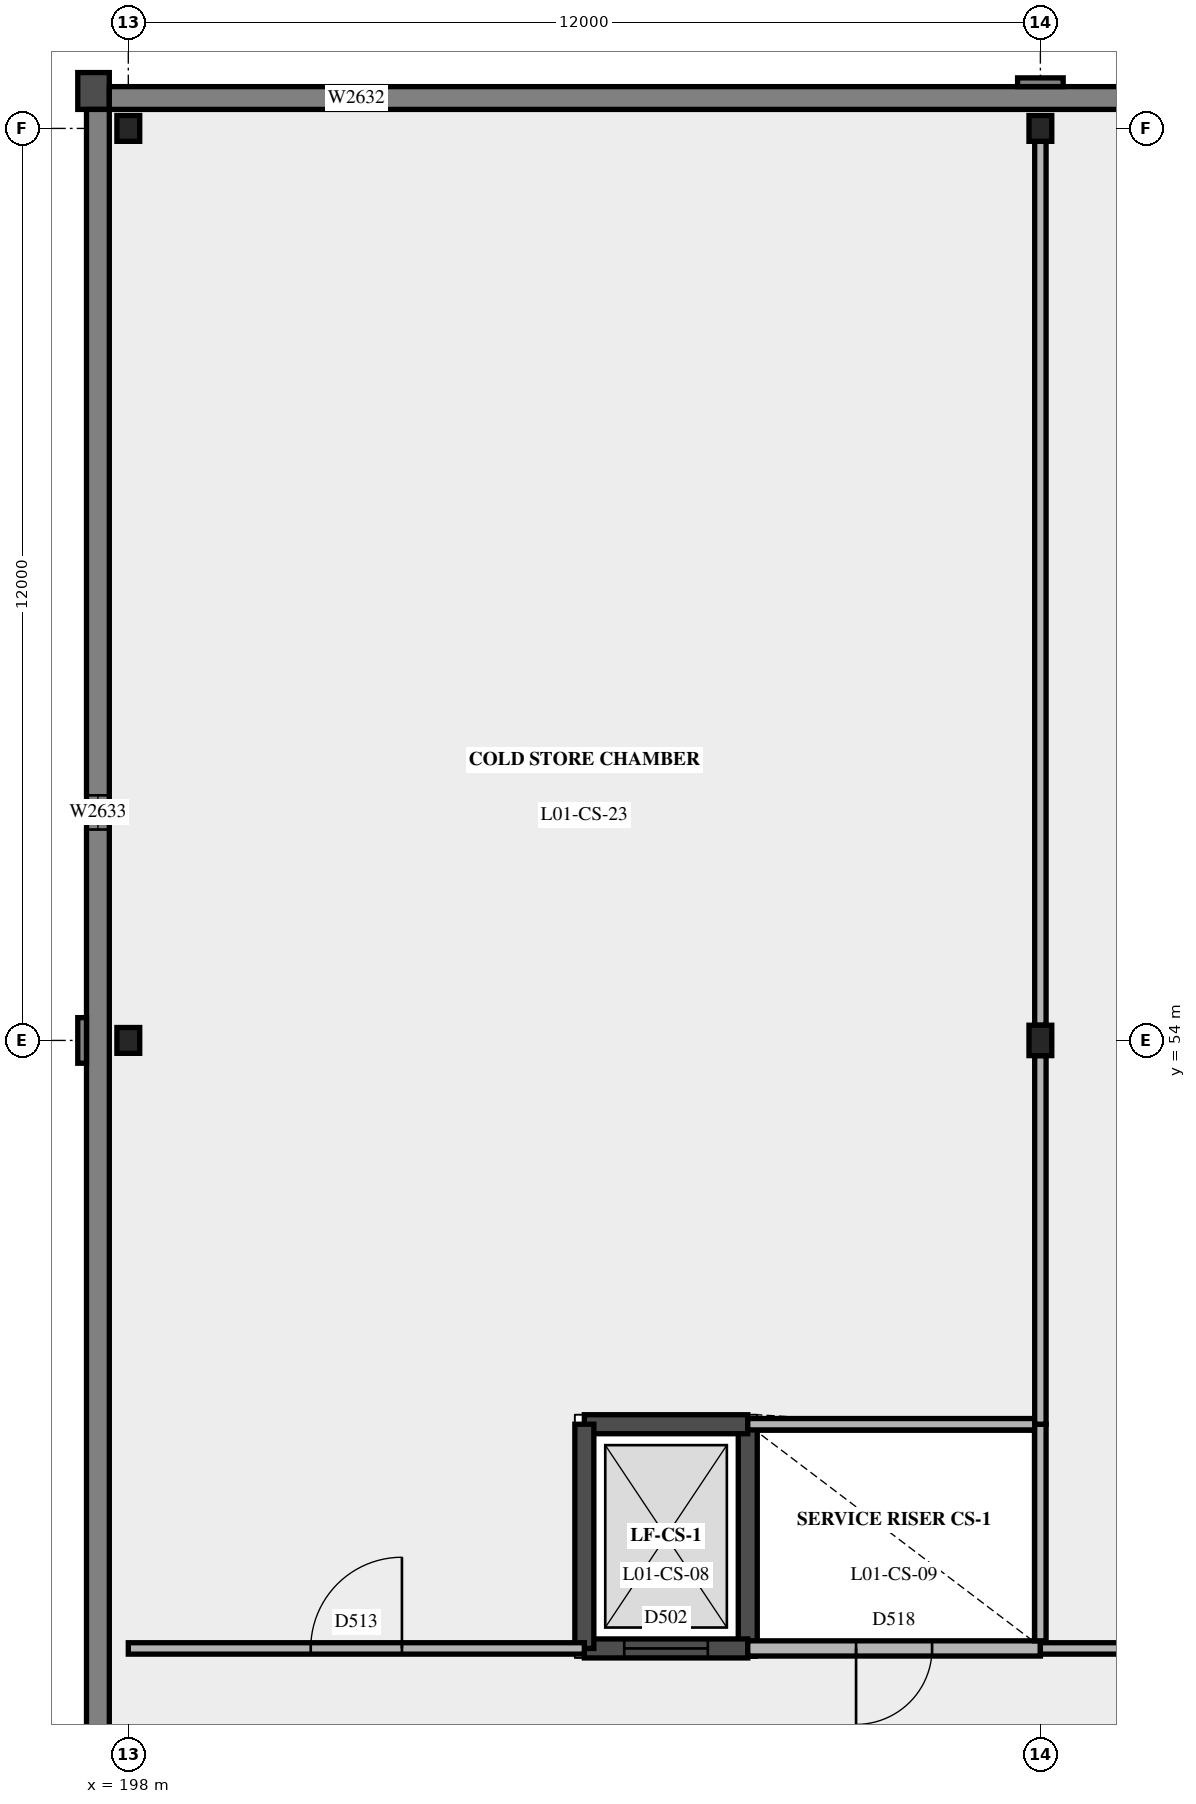
"""IFC4 building model, lengths in metres.
Left out: names, types, materials, properties, quantities, classifications, styles, units other than length and angle.
Written with IfcOpenShell. Run it as: python <this file> out.ifc"""

import sys

from ifc_helpers import new_model, si_unit, direction, frame, frame_2d, origin, origin_2d, place, context, subcontext, project, spatial, polyline, rectangle, i_section, outline, extrude, element, fill, save


model = new_model("IFC4")
c1 = context("Model", 3, precision=1e-05, world=origin(), true_north=direction((0.0, 1.0)))
c2 = subcontext(c1, "Body", "Model", "MODEL_VIEW")
j1 = project(units=[si_unit("LENGTHUNIT", "METRE"), si_unit("PLANEANGLEUNIT", "RADIAN")], contexts=[c1])
p1 = place(None, origin())
s1 = spatial("IfcSite", under=j1, at=p1, CompositionType="ELEMENT")
p2 = place(p1, origin())
s2 = spatial("IfcBuilding", under=s1, at=p2, CompositionType="ELEMENT")
p3 = place(p2, frame((0.0, 0.0, 5.4)))
s3 = spatial("IfcBuildingStorey", under=s2, at=p3, CompositionType="ELEMENT", Elevation=5.4)
for number, where, z_axis, x_axis in (
    (1, (198.0, 54.0, 0.0), (0.0, 0.0, 1.0), (1.0, 0.0, 0.0)),
    (2, (198.0, 66.0, 0.0), (0.0, 0.0, 1.0), (1.0, 0.0, 0.0)),
):
    element("IfcColumn", number, at=place(p3, frame(where, z_axis=z_axis, x_axis=x_axis)), inside=s3, PredefinedType="COLUMN", context=c2, shape_type="SweptSolid", body=[
        extrude(i_section(OverallWidth=0.3, OverallDepth=0.34, WebThickness=0.012, FlangeThickness=0.021, at=origin_2d()), origin(), (0.0, 0.0, 1.0), 5.4),
    ])
p4 = place(p3, frame((210.0, 54.0, 0.0), z_axis=(0.0, 0.0, 1.0), x_axis=(1.0, 0.0, 0.0)))
e3 = element("IfcColumn", 3, at=p4, inside=s3, PredefinedType="COLUMN", context=c2, shape_type="SweptSolid", body=[
    extrude(i_section(OverallWidth=0.3, OverallDepth=0.4, WebThickness=0.013, FlangeThickness=0.024, at=origin_2d()), origin(), (0.0, 0.0, 1.0), 5.4),
])
p5 = place(p3, frame((210.0, 66.0, 0.0), z_axis=(0.0, 0.0, 1.0), x_axis=(1.0, 0.0, 0.0)))
e4 = element("IfcColumn", 4, at=p5, inside=s3, PredefinedType="COLUMN", context=c2, shape_type="SweptSolid", body=[
    extrude(i_section(OverallWidth=0.3, OverallDepth=0.34, WebThickness=0.012, FlangeThickness=0.021, at=origin_2d()), origin(), (0.0, 0.0, 1.0), 5.4),
])
p6 = place(p3, frame((197.75, 66.528, -0.39), z_axis=(0.0, 0.0, 1.0), x_axis=(-1.0, 0.0, 0.0)))
e5 = element("IfcWall", 5, at=p6, inside=s3, PredefinedType="SOLIDWALL", context=c2, shape_type="SweptSolid", body=[
    extrude(rectangle(XDim=0.53, YDim=0.555, at=frame_2d((0.265, 0.0))), origin(), (0.0, 0.0, 1.0), 0.13),
])
p7 = place(p3, frame((197.75, 66.562, -0.26), z_axis=(0.0, 0.0, 1.0), x_axis=(-1.0, 0.0, 0.0)))
e6 = element("IfcWall", 6, at=p7, inside=s3, PredefinedType="SOLIDWALL", context=c2, shape_type="SweptSolid", body=[
    extrude(rectangle(XDim=0.645, YDim=0.625, at=frame_2d((0.323, 0.0))), origin(), (0.0, 0.0, 1.0), 0.13),
])
p8 = place(p3, frame((197.75, 66.597, -0.13), z_axis=(0.0, 0.0, 1.0), x_axis=(-1.0, 0.0, 0.0)))
e7 = element("IfcWall", 7, at=p8, inside=s3, PredefinedType="SOLIDWALL", context=c2, shape_type="SweptSolid", body=[
    extrude(rectangle(XDim=0.76, YDim=0.695, at=frame_2d((0.38, 0.0))), origin(), (0.0, 0.0, 1.0), 0.13),
])
p9 = place(p3, frame((197.75, 66.492, 0.0), z_axis=(0.0, 0.0, 1.0), x_axis=(-1.0, 0.0, 0.0)))
e8 = element("IfcWall", 8, at=p9, inside=s3, PredefinedType="SOLIDWALL", context=c2, shape_type="SweptSolid", body=[
    extrude(rectangle(XDim=0.415, YDim=0.485, at=frame_2d((0.208, 0.0))), origin(), (0.0, 0.0, 1.0), 5.01),
])
p10 = place(p3, frame((197.75, 66.528, 5.01), z_axis=(0.0, 0.0, 1.0), x_axis=(-1.0, 0.0, 0.0)))
e9 = element("IfcWall", 9, at=p10, inside=s3, PredefinedType="SOLIDWALL", context=c2, shape_type="SweptSolid", body=[
    extrude(rectangle(XDim=0.53, YDim=0.555, at=frame_2d((0.265, 0.0))), origin(), (0.0, 0.0, 1.0), 0.13),
])
p11 = place(p3, frame((197.75, 66.562, 5.14), z_axis=(0.0, 0.0, 1.0), x_axis=(-1.0, 0.0, 0.0)))
e10 = element("IfcWall", 10, at=p11, inside=s3, PredefinedType="SOLIDWALL", context=c2, shape_type="SweptSolid", body=[
    extrude(rectangle(XDim=0.645, YDim=0.625, at=frame_2d((0.323, 0.0))), origin(), (0.0, 0.0, 1.0), 0.13),
])
p12 = place(p3, frame((197.75, 66.597, 5.27), z_axis=(0.0, 0.0, 1.0), x_axis=(-1.0, 0.0, 0.0)))
e11 = element("IfcWall", 11, at=p12, inside=s3, PredefinedType="SOLIDWALL", context=c2, shape_type="SweptSolid", body=[
    extrude(rectangle(XDim=0.76, YDim=0.695, at=frame_2d((0.38, 0.0))), origin(), (0.0, 0.0, 1.0), 0.13),
])
p13 = place(p3, frame((282.25, 66.4, 0.0), z_axis=(0.0, 0.0, 1.0), x_axis=(-1.0, 0.0, 0.0)))
e12 = element("IfcWall", 12, at=p13, inside=s3, PredefinedType="SOLIDWALL", context=c2, shape_type="SweptSolid", body=[
    extrude(rectangle(XDim=84.5, YDim=0.3, at=frame_2d((42.25, 0.0))), origin(), (0.0, 0.0, 1.0), 5.4),
])
p14 = place(p13, frame((9.025, 0.0, 1.8)))
e13 = element("IfcOpeningElement", 13, at=p14, cuts=e12, PredefinedType="OPENING", context=c2, shape_type="SweptSolid", body=[
    extrude(rectangle(XDim=0.45, YDim=2.4, at=frame_2d((0.225, 1.2))), frame((0.0, 0.16, 0.0), z_axis=(0.0, -1.0, 0.0), x_axis=(1.0, 0.0, 0.0)), (0.0, 0.0, 1.0), 0.32),
])
p15 = place(p13, frame((21.025, 0.0, 1.8)))
e14 = element("IfcOpeningElement", 14, at=p15, cuts=e12, PredefinedType="OPENING", context=c2, shape_type="SweptSolid", body=[
    extrude(rectangle(XDim=0.45, YDim=2.4, at=frame_2d((0.225, 1.2))), frame((0.0, 0.16, 0.0), z_axis=(0.0, -1.0, 0.0), x_axis=(1.0, 0.0, 0.0)), (0.0, 0.0, 1.0), 0.32),
])
p16 = place(p13, frame((33.025, 0.0, 1.8)))
e15 = element("IfcOpeningElement", 15, at=p16, cuts=e12, PredefinedType="OPENING", context=c2, shape_type="SweptSolid", body=[
    extrude(rectangle(XDim=0.45, YDim=2.4, at=frame_2d((0.225, 1.2))), frame((0.0, 0.16, 0.0), z_axis=(0.0, -1.0, 0.0), x_axis=(1.0, 0.0, 0.0)), (0.0, 0.0, 1.0), 0.32),
])
p17 = place(p13, frame((45.025, 0.0, 1.8)))
e16 = element("IfcOpeningElement", 16, at=p17, cuts=e12, PredefinedType="OPENING", context=c2, shape_type="SweptSolid", body=[
    extrude(rectangle(XDim=0.45, YDim=2.4, at=frame_2d((0.225, 1.2))), frame((0.0, 0.16, 0.0), z_axis=(0.0, -1.0, 0.0), x_axis=(1.0, 0.0, 0.0)), (0.0, 0.0, 1.0), 0.32),
])
p18 = place(p13, frame((57.025, 0.0, 1.8)))
e17 = element("IfcOpeningElement", 17, at=p18, cuts=e12, PredefinedType="OPENING", context=c2, shape_type="SweptSolid", body=[
    extrude(rectangle(XDim=0.45, YDim=2.4, at=frame_2d((0.225, 1.2))), frame((0.0, 0.16, 0.0), z_axis=(0.0, -1.0, 0.0), x_axis=(1.0, 0.0, 0.0)), (0.0, 0.0, 1.0), 0.32),
])
p19 = place(p13, frame((69.025, 0.0, 1.8)))
e18 = element("IfcOpeningElement", 18, at=p19, cuts=e12, PredefinedType="OPENING", context=c2, shape_type="SweptSolid", body=[
    extrude(rectangle(XDim=0.45, YDim=2.4, at=frame_2d((0.225, 1.2))), frame((0.0, 0.16, 0.0), z_axis=(0.0, -1.0, 0.0), x_axis=(1.0, 0.0, 0.0)), (0.0, 0.0, 1.0), 0.32),
])
p20 = place(p13, frame((81.025, 0.0, 1.8)))
e19 = element("IfcOpeningElement", 19, at=p20, cuts=e12, PredefinedType="OPENING", context=c2, shape_type="SweptSolid", body=[
    extrude(rectangle(XDim=0.45, YDim=2.4, at=frame_2d((0.225, 1.2))), frame((0.0, 0.16, 0.0), z_axis=(0.0, -1.0, 0.0), x_axis=(1.0, 0.0, 0.0)), (0.0, 0.0, 1.0), 0.32),
])
p21 = place(p3, frame((210.3, 66.607, 0.0), z_axis=(0.0, 0.0, 1.0), x_axis=(-1.0, 0.0, 0.0)))
e20 = element("IfcWall", 20, at=p21, inside=s3, PredefinedType="SOLIDWALL", context=c2, shape_type="SweptSolid", body=[
    extrude(rectangle(XDim=0.6, YDim=0.115, at=frame_2d((0.3, 0.0))), origin(), (0.0, 0.0, 1.0), 5.4),
])
p22 = place(p3, frame((197.6, 66.25, 0.0), z_axis=(0.0, 0.0, 1.0), x_axis=(0.0, -1.0, 0.0)))
e21 = element("IfcWall", 21, at=p22, inside=s3, PredefinedType="SOLIDWALL", context=c2, shape_type="SweptSolid", body=[
    extrude(rectangle(XDim=48.5, YDim=0.3, at=frame_2d((24.25, 0.0))), origin(), (0.0, 0.0, 1.0), 5.4),
])
p23 = place(p22, frame((9.025, 0.0, 1.8)))
e22 = element("IfcOpeningElement", 22, at=p23, cuts=e21, PredefinedType="OPENING", context=c2, shape_type="SweptSolid", body=[
    extrude(rectangle(XDim=0.45, YDim=2.4, at=frame_2d((0.225, 1.2))), frame((0.0, 0.16, 0.0), z_axis=(0.0, -1.0, 0.0), x_axis=(1.0, 0.0, 0.0)), (0.0, 0.0, 1.0), 0.32),
])
p24 = place(p22, frame((33.025, 0.0, 1.8)))
e23 = element("IfcOpeningElement", 23, at=p24, cuts=e21, PredefinedType="OPENING", context=c2, shape_type="SweptSolid", body=[
    extrude(rectangle(XDim=0.45, YDim=2.4, at=frame_2d((0.225, 1.2))), frame((0.0, 0.16, 0.0), z_axis=(0.0, -1.0, 0.0), x_axis=(1.0, 0.0, 0.0)), (0.0, 0.0, 1.0), 0.32),
])
p25 = place(p22, frame((45.025, 0.0, 1.8)))
e24 = element("IfcOpeningElement", 24, at=p25, cuts=e21, PredefinedType="OPENING", context=c2, shape_type="SweptSolid", body=[
    extrude(rectangle(XDim=0.45, YDim=2.4, at=frame_2d((0.225, 1.2))), frame((0.0, 0.16, 0.0), z_axis=(0.0, -1.0, 0.0), x_axis=(1.0, 0.0, 0.0)), (0.0, 0.0, 1.0), 0.32),
])
p26 = place(p3, frame((197.393, 54.3, 0.0), z_axis=(0.0, 0.0, 1.0), x_axis=(0.0, -1.0, 0.0)))
e25 = element("IfcWall", 25, at=p26, inside=s3, PredefinedType="SOLIDWALL", context=c2, shape_type="SweptSolid", body=[
    extrude(rectangle(XDim=0.6, YDim=0.115, at=frame_2d((0.3, 0.0))), origin(), (0.0, 0.0, 1.0), 5.4),
])
p27 = place(p3, frame((206.15, 46.0, 0.0), z_axis=(0.0, 0.0, 1.0), x_axis=(0.0, 1.0, 0.0)))
e26 = element("IfcWall", 26, at=p27, inside=s3, PredefinedType="SHEAR", context=c2, shape_type="SweptSolid", body=[
    extrude(rectangle(XDim=2.95, YDim=0.25, at=frame_2d((1.475, 0.0))), origin(), (0.0, 0.0, 1.0), 5.4),
])
p28 = place(p3, frame((206.15, 48.95, 0.0), z_axis=(0.0, 0.0, 1.0), x_axis=(-1.0, 0.0, 0.0)))
e27 = element("IfcWall", 27, at=p28, inside=s3, PredefinedType="SHEAR", context=c2, shape_type="SweptSolid", body=[
    extrude(rectangle(XDim=2.15, YDim=0.25, at=frame_2d((1.075, 0.0))), origin(), (0.0, 0.0, 1.0), 5.4),
])
p29 = place(p3, frame((204.0, 46.0, 0.0), z_axis=(0.0, 0.0, 1.0), x_axis=(1.0, 0.0, 0.0)))
e28 = element("IfcWall", 28, at=p29, inside=s3, PredefinedType="SHEAR", context=c2, shape_type="SweptSolid", body=[
    extrude(rectangle(XDim=2.15, YDim=0.25, at=frame_2d((1.075, 0.0))), origin(), (0.0, 0.0, 1.0), 5.4),
])
p30 = place(p29, frame((0.525, 0.0, 0.0)))
e29 = element("IfcOpeningElement", 29, at=p30, cuts=e28, PredefinedType="OPENING", context=c2, shape_type="SweptSolid", body=[
    extrude(rectangle(XDim=1.1, YDim=2.1, at=frame_2d((0.55, 1.05))), frame((0.0, 0.135, 0.0), z_axis=(0.0, -1.0, 0.0), x_axis=(1.0, 0.0, 0.0)), (0.0, 0.0, 1.0), 0.27),
])
p31 = place(p3, frame((204.0, 48.95, 0.0), z_axis=(0.0, 0.0, 1.0), x_axis=(0.0, -1.0, 0.0)))
e30 = element("IfcWall", 30, at=p31, inside=s3, PredefinedType="SHEAR", context=c2, shape_type="SweptSolid", body=[
    extrude(rectangle(XDim=2.95, YDim=0.25, at=frame_2d((1.475, 0.0))), origin(), (0.0, 0.0, 1.0), 5.4),
])
p32 = place(p3, frame((198.0, 46.0, 0.0), z_axis=(0.0, 0.0, 1.0), x_axis=(1.0, 0.0, 0.0)))
e31 = element("IfcWall", 31, at=p32, inside=s3, PredefinedType="PARTITIONING", context=c2, shape_type="SweptSolid", body=[
    extrude(outline(polyline([(0.0, 0.0), (6.0, 0.0), (6.0, 5.15), (4.905, 5.15), (4.9, 4.63), (4.7, 4.63), (4.695, 5.15), (2.505, 5.15), (2.5, 4.63), (2.3, 4.63), (2.295, 5.15), (0.1, 5.15), (0.095, 4.68), (0.0, 4.68), (0.0, 0.0)])), frame((0.0, 0.075, 0.0), z_axis=(0.0, -1.0, 0.0), x_axis=(1.0, 0.0, 0.0)), (0.0, 0.0, 1.0), 0.15),
])
p33 = place(p32, frame((2.4, 0.0, 0.0)))
e32 = element("IfcOpeningElement", 32, at=p33, cuts=e31, PredefinedType="OPENING", context=c2, shape_type="SweptSolid", body=[
    extrude(rectangle(XDim=1.2, YDim=2.4, at=frame_2d((0.6, 1.2))), frame((0.0, 0.085, 0.0), z_axis=(0.0, -1.0, 0.0), x_axis=(1.0, 0.0, 0.0)), (0.0, 0.0, 1.0), 0.17),
])
p34 = place(p3, frame((206.15, 46.0, 0.0), z_axis=(0.0, 0.0, 1.0), x_axis=(1.0, 0.0, 0.0)))
e33 = element("IfcWall", 33, at=p34, inside=s3, PredefinedType="PARTITIONING", context=c2, shape_type="SweptSolid", body=[
    extrude(outline(polyline([(0.0, 0.0), (3.85, 0.0), (3.85, 4.68), (3.755, 4.68), (3.75, 5.15), (1.555, 5.15), (1.55, 4.63), (1.35, 4.63), (1.345, 5.15), (0.0, 5.15), (0.0, 0.0)])), frame((0.0, 0.1, 0.0), z_axis=(0.0, -1.0, 0.0), x_axis=(1.0, 0.0, 0.0)), (0.0, 0.0, 1.0), 0.2),
])
p35 = place(p34, frame((1.425, 0.0, 0.0)))
e34 = element("IfcOpeningElement", 34, at=p35, cuts=e33, PredefinedType="OPENING", context=c2, shape_type="SweptSolid", body=[
    extrude(rectangle(XDim=1.0, YDim=2.1, at=frame_2d((0.5, 1.05))), frame((0.0, 0.11, 0.0), z_axis=(0.0, -1.0, 0.0), x_axis=(1.0, 0.0, 0.0)), (0.0, 0.0, 1.0), 0.22),
])
p36 = place(p3, frame((210.0, 46.0, 0.0), z_axis=(0.0, 0.0, 1.0), x_axis=(1.0, 0.0, 0.0)))
e35 = element("IfcWall", 35, at=p36, inside=s3, PredefinedType="PARTITIONING", context=c2, shape_type="SweptSolid", body=[
    extrude(outline(polyline([(0.0, 0.0), (12.0, 0.0), (12.0, 5.15), (9.705, 5.15), (9.7, 4.63), (9.5, 4.63), (9.495, 5.15), (7.305, 5.15), (7.3, 4.63), (7.1, 4.63), (7.095, 5.15), (4.905, 5.15), (4.9, 4.63), (4.7, 4.63), (4.695, 5.15), (2.505, 5.15), (2.5, 4.63), (2.3, 4.63), (2.295, 5.15), (0.1, 5.15), (0.095, 4.68), (0.0, 4.68), (0.0, 0.0)])), frame((0.0, 0.075, 0.0), z_axis=(0.0, -1.0, 0.0), x_axis=(1.0, 0.0, 0.0)), (0.0, 0.0, 1.0), 0.15),
])
p37 = place(p36, frame((5.4, 0.0, 0.0)))
e36 = element("IfcOpeningElement", 36, at=p37, cuts=e35, PredefinedType="OPENING", context=c2, shape_type="SweptSolid", body=[
    extrude(rectangle(XDim=1.2, YDim=2.4, at=frame_2d((0.6, 1.2))), frame((0.0, 0.085, 0.0), z_axis=(0.0, -1.0, 0.0), x_axis=(1.0, 0.0, 0.0)), (0.0, 0.0, 1.0), 0.17),
])
p38 = place(p3, frame((206.15, 48.95, 0.0), z_axis=(0.0, 0.0, 1.0), x_axis=(1.0, 0.0, 0.0)))
e37 = element("IfcWall", 37, at=p38, inside=s3, PredefinedType="PARTITIONING", context=c2, shape_type="SweptSolid", body=[
    extrude(outline(polyline([(0.0, 0.0), (3.775, 0.0), (3.775, 4.68), (3.755, 4.68), (3.75, 5.15), (1.555, 5.15), (1.55, 4.63), (1.35, 4.63), (1.345, 5.15), (0.0, 5.15), (0.0, 0.0)])), frame((0.0, 0.075, 0.0), z_axis=(0.0, -1.0, 0.0), x_axis=(1.0, 0.0, 0.0)), (0.0, 0.0, 1.0), 0.15),
])
p39 = place(p3, frame((210.0, 46.1, 0.0), z_axis=(0.0, 0.0, 1.0), x_axis=(0.0, 1.0, 0.0)))
e38 = element("IfcWall", 38, at=p39, inside=s3, PredefinedType="PARTITIONING", context=c2, shape_type="SweptSolid", body=[
    extrude(rectangle(XDim=2.85, YDim=0.15, at=frame_2d((1.425, 0.0))), origin(), (0.0, 0.0, 1.0), 4.68),
])
p40 = place(p3, frame((210.0, 48.95, 0.0), z_axis=(0.0, 0.0, 1.0), x_axis=(0.0, 1.0, 0.0)))
e39 = element("IfcWall", 39, at=p40, inside=s3, PredefinedType="PARTITIONING", context=c2, shape_type="SweptSolid", body=[
    extrude(rectangle(XDim=4.85, YDim=0.15, at=frame_2d((2.425, 0.0))), origin(), (0.0, 0.0, 1.0), 4.68),
])
p41 = place(p3, frame((210.0, 54.2, 0.0), z_axis=(0.0, 0.0, 1.0), x_axis=(0.0, 1.0, 0.0)))
e40 = element("IfcWall", 40, at=p41, inside=s3, PredefinedType="PARTITIONING", context=c2, shape_type="SweptSolid", body=[
    extrude(rectangle(XDim=11.63, YDim=0.15, at=frame_2d((5.815, 0.0))), origin(), (0.0, 0.0, 1.0), 4.68),
])
p42 = place(p20, origin())
e41 = element("IfcWindow", 41, at=p42, inside=s3, PartitioningType="SINGLE_PANEL", PredefinedType="WINDOW", context=c2, shape_type="SweptSolid", body=[
    extrude(rectangle(XDim=0.45, YDim=2.4, at=frame_2d((0.225, 1.2))), frame((0.0, 0.03, 0.0), z_axis=(0.0, -1.0, 0.0), x_axis=(1.0, 0.0, 0.0)), (0.0, 0.0, 1.0), 0.06),
])
fill(e19, e41)
p43 = place(p23, origin())
e42 = element("IfcWindow", 42, at=p43, inside=s3, PartitioningType="SINGLE_PANEL", PredefinedType="WINDOW", context=c2, shape_type="SweptSolid", body=[
    extrude(rectangle(XDim=0.45, YDim=2.4, at=frame_2d((0.225, 1.2))), frame((0.0, 0.03, 0.0), z_axis=(0.0, -1.0, 0.0), x_axis=(1.0, 0.0, 0.0)), (0.0, 0.0, 1.0), 0.06),
])
fill(e22, e42)
p44 = place(p30, origin())
e43 = element("IfcDoor", 43, at=p44, inside=s3, OperationType="SLIDING_TO_LEFT", PredefinedType="DOOR", context=c2, shape_type="SweptSolid", body=[
    extrude(rectangle(XDim=1.1, YDim=2.1, at=frame_2d((0.55, 1.05))), frame((0.0, 0.025, 0.0), z_axis=(0.0, -1.0, 0.0), x_axis=(1.0, 0.0, 0.0)), (0.0, 0.0, 1.0), 0.05),
])
fill(e29, e43)
p45 = place(p33, origin())
e44 = element("IfcDoor", 44, at=p45, inside=s3, OperationType="SINGLE_SWING_RIGHT", PredefinedType="DOOR", context=c2, shape_type="SweptSolid", body=[
    extrude(rectangle(XDim=1.2, YDim=2.4, at=frame_2d((0.6, 1.2))), frame((0.0, 0.025, 0.0), z_axis=(0.0, -1.0, 0.0), x_axis=(1.0, 0.0, 0.0)), (0.0, 0.0, 1.0), 0.05),
])
fill(e32, e44)
p46 = place(p35, origin())
e45 = element("IfcDoor", 45, at=p46, inside=s3, OperationType="SINGLE_SWING_RIGHT", PredefinedType="DOOR", context=c2, shape_type="SweptSolid", body=[
    extrude(rectangle(XDim=1.0, YDim=2.1, at=frame_2d((0.5, 1.05))), frame((0.0, 0.025, 0.0), z_axis=(0.0, -1.0, 0.0), x_axis=(1.0, 0.0, 0.0)), (0.0, 0.0, 1.0), 0.05),
])
fill(e34, e45)
save(model, sys.argv[1])
